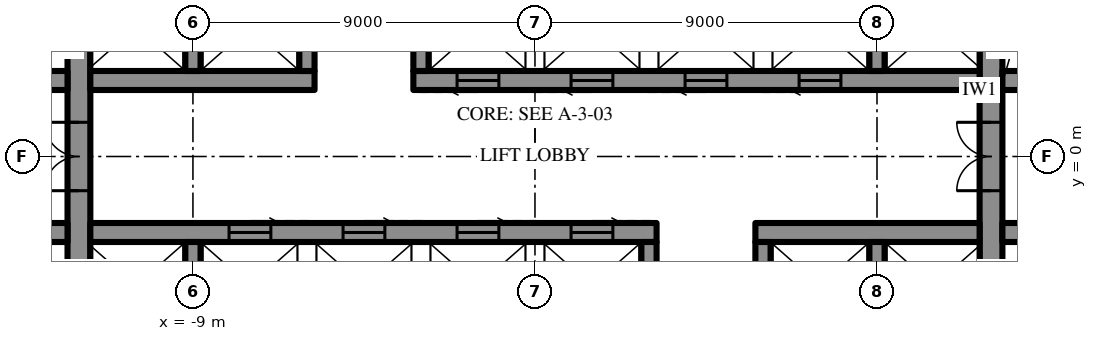
"""IFC4 building model, lengths in metres.
Left out: names, types, materials, properties, quantities, classifications, styles, units other than length and angle.
Written with IfcOpenShell. Run it as: python <this file> out.ifc"""

import sys

from ifc_helpers import new_model, si_unit, direction, frame, frame_2d, origin, place, context, subcontext, project, spatial, rectangle, extrude, element, fill, save


model = new_model("IFC4")
c1 = context("Model", 3, precision=1e-05, world=origin(), true_north=direction((0.0, 1.0)))
c2 = subcontext(c1, "Body", "Model", "MODEL_VIEW")
j1 = project(units=[si_unit("LENGTHUNIT", "METRE"), si_unit("PLANEANGLEUNIT", "RADIAN")], contexts=[c1])
p1 = place(None, origin())
s1 = spatial("IfcSite", under=j1, at=p1, CompositionType="ELEMENT")
p2 = place(p1, origin())
s2 = spatial("IfcBuilding", under=s1, at=p2, CompositionType="ELEMENT")
p3 = place(p2, frame((0.0, 0.0, 257.5)))
s3 = spatial("IfcBuildingStorey", under=s2, at=p3, CompositionType="ELEMENT", Elevation=257.5)
p4 = place(p3, frame((12.0, -10.7, 0.0), z_axis=(0.0, 0.0, 1.0), x_axis=(0.0, 1.0, 0.0)))
e1 = element("IfcWall", 1, at=p4, inside=s3, PredefinedType="SHEAR", context=c2, shape_type="SweptSolid", body=[
    extrude(rectangle(XDim=21.4, YDim=0.6, at=frame_2d((10.7, 0.0))), origin(), (0.0, 0.0, 1.0), 4.2),
])
p5 = place(p4, frame((9.8, 0.0, 0.0)))
e2 = element("IfcOpeningElement", 2, at=p5, cuts=e1, PredefinedType="OPENING", context=c2, shape_type="SweptSolid", body=[
    extrude(rectangle(XDim=1.8, YDim=2.4, at=frame_2d((0.9, 1.2))), frame((0.0, 0.31, 0.0), z_axis=(0.0, -1.0, 0.0), x_axis=(1.0, 0.0, 0.0)), (0.0, 0.0, 1.0), 0.62),
])
p6 = place(p3, frame((-12.0, -10.7, 0.0), z_axis=(0.0, 0.0, 1.0), x_axis=(0.0, 1.0, 0.0)))
e3 = element("IfcWall", 3, at=p6, inside=s3, PredefinedType="SHEAR", context=c2, shape_type="SweptSolid", body=[
    extrude(rectangle(XDim=21.4, YDim=0.6, at=frame_2d((10.7, 0.0))), origin(), (0.0, 0.0, 1.0), 4.2),
])
p7 = place(p6, frame((9.8, 0.0, 0.0)))
e4 = element("IfcOpeningElement", 4, at=p7, cuts=e3, PredefinedType="OPENING", context=c2, shape_type="SweptSolid", body=[
    extrude(rectangle(XDim=1.8, YDim=2.4, at=frame_2d((0.9, 1.2))), frame((0.0, 0.31, 0.0), z_axis=(0.0, -1.0, 0.0), x_axis=(1.0, 0.0, 0.0)), (0.0, 0.0, 1.0), 0.62),
])
p8 = place(p3, frame((-14.5, 2.0, 0.0), z_axis=(0.0, 0.0, 1.0), x_axis=(1.0, 0.0, 0.0)))
e5 = element("IfcWall", 5, at=p8, inside=s3, PredefinedType="SHEAR", context=c2, shape_type="SweptSolid", body=[
    extrude(rectangle(XDim=2.2, YDim=0.5, at=frame_2d((1.1, 0.0))), origin(), (0.0, 0.0, 1.0), 4.2),
])
p9 = place(p8, frame((0.5, 0.0, 0.0)))
e6 = element("IfcOpeningElement", 6, at=p9, cuts=e5, PredefinedType="OPENING", context=c2, shape_type="SweptSolid", body=[
    extrude(rectangle(XDim=0.9, YDim=2.2, at=frame_2d((0.45, 1.1))), frame((0.0, 0.26, 0.0), z_axis=(0.0, -1.0, 0.0), x_axis=(1.0, 0.0, 0.0)), (0.0, 0.0, 1.0), 0.52),
])
p10 = place(p3, frame((-11.7, 2.0, 0.0), z_axis=(0.0, 0.0, 1.0), x_axis=(1.0, 0.0, 0.0)))
e7 = element("IfcWall", 7, at=p10, inside=s3, PredefinedType="SHEAR", context=c2, shape_type="SweptSolid", body=[
    extrude(rectangle(XDim=5.9, YDim=0.5, at=frame_2d((2.95, 0.0))), origin(), (0.0, 0.0, 1.0), 4.2),
])
p11 = place(p3, frame((-3.2, 2.0, 0.0), z_axis=(0.0, 0.0, 1.0), x_axis=(1.0, 0.0, 0.0)))
e8 = element("IfcWall", 8, at=p11, inside=s3, PredefinedType="SHEAR", context=c2, shape_type="SweptSolid", body=[
    extrude(rectangle(XDim=14.9, YDim=0.5, at=frame_2d((7.45, 0.0))), origin(), (0.0, 0.0, 1.0), 4.2),
])
p12 = place(p11, frame((1.15, 0.0, 0.0)))
e9 = element("IfcOpeningElement", 9, at=p12, cuts=e8, PredefinedType="OPENING", context=c2, shape_type="SweptSolid", body=[
    extrude(rectangle(XDim=1.1, YDim=2.2, at=frame_2d((0.55, 1.1))), frame((0.0, 0.26, 0.0), z_axis=(0.0, -1.0, 0.0), x_axis=(1.0, 0.0, 0.0)), (0.0, 0.0, 1.0), 0.52),
])
p13 = place(p11, frame((4.15, 0.0, 0.0)))
e10 = element("IfcOpeningElement", 10, at=p13, cuts=e8, PredefinedType="OPENING", context=c2, shape_type="SweptSolid", body=[
    extrude(rectangle(XDim=1.1, YDim=2.2, at=frame_2d((0.55, 1.1))), frame((0.0, 0.26, 0.0), z_axis=(0.0, -1.0, 0.0), x_axis=(1.0, 0.0, 0.0)), (0.0, 0.0, 1.0), 0.52),
])
p14 = place(p11, frame((7.15, 0.0, 0.0)))
e11 = element("IfcOpeningElement", 11, at=p14, cuts=e8, PredefinedType="OPENING", context=c2, shape_type="SweptSolid", body=[
    extrude(rectangle(XDim=1.1, YDim=2.2, at=frame_2d((0.55, 1.1))), frame((0.0, 0.26, 0.0), z_axis=(0.0, -1.0, 0.0), x_axis=(1.0, 0.0, 0.0)), (0.0, 0.0, 1.0), 0.52),
])
p15 = place(p11, frame((10.15, 0.0, 0.0)))
e12 = element("IfcOpeningElement", 12, at=p15, cuts=e8, PredefinedType="OPENING", context=c2, shape_type="SweptSolid", body=[
    extrude(rectangle(XDim=1.1, YDim=2.2, at=frame_2d((0.55, 1.1))), frame((0.0, 0.26, 0.0), z_axis=(0.0, -1.0, 0.0), x_axis=(1.0, 0.0, 0.0)), (0.0, 0.0, 1.0), 0.52),
])
p16 = place(p3, frame((12.3, 2.0, 0.0), z_axis=(0.0, 0.0, 1.0), x_axis=(1.0, 0.0, 0.0)))
e13 = element("IfcWall", 13, at=p16, inside=s3, PredefinedType="SHEAR", context=c2, shape_type="SweptSolid", body=[
    extrude(rectangle(XDim=2.2, YDim=0.5, at=frame_2d((1.1, 0.0))), origin(), (0.0, 0.0, 1.0), 4.2),
])
p17 = place(p16, frame((0.8, 0.0, 0.0)))
e14 = element("IfcOpeningElement", 14, at=p17, cuts=e13, PredefinedType="OPENING", context=c2, shape_type="SweptSolid", body=[
    extrude(rectangle(XDim=0.9, YDim=2.2, at=frame_2d((0.45, 1.1))), frame((0.0, 0.26, 0.0), z_axis=(0.0, -1.0, 0.0), x_axis=(1.0, 0.0, 0.0)), (0.0, 0.0, 1.0), 0.52),
])
for number, where, z_axis, x_axis in (
    (15, (-9.0, 2.25, 0.0), (0.0, 0.0, 1.0), (0.0, 1.0, 0.0)),
    (16, (-6.0, 2.25, 0.0), (0.0, 0.0, 1.0), (0.0, 1.0, 0.0)),
    (17, (-3.0, 2.25, 0.0), (0.0, 0.0, 1.0), (0.0, 1.0, 0.0)),
    (18, (9.0, 2.25, 0.0), (0.0, 0.0, 1.0), (0.0, 1.0, 0.0)),
):
    element("IfcWall", number, at=place(p3, frame(where, z_axis=z_axis, x_axis=x_axis)), inside=s3, PredefinedType="SHEAR", context=c2, shape_type="SweptSolid", body=[
        extrude(rectangle(XDim=2.3, YDim=0.4, at=frame_2d((1.15, 0.0))), origin(), (0.0, 0.0, 1.0), 4.2),
    ])
p18 = place(p3, frame((14.5, -2.0, 0.0), z_axis=(0.0, 0.0, 1.0), x_axis=(-1.0, 0.0, 0.0)))
e19 = element("IfcWall", 19, at=p18, inside=s3, PredefinedType="SHEAR", context=c2, shape_type="SweptSolid", body=[
    extrude(rectangle(XDim=2.2, YDim=0.5, at=frame_2d((1.1, 0.0))), origin(), (0.0, 0.0, 1.0), 4.2),
])
p19 = place(p18, frame((0.5, 0.0, 0.0)))
e20 = element("IfcOpeningElement", 20, at=p19, cuts=e19, PredefinedType="OPENING", context=c2, shape_type="SweptSolid", body=[
    extrude(rectangle(XDim=0.9, YDim=2.2, at=frame_2d((0.45, 1.1))), frame((0.0, 0.26, 0.0), z_axis=(0.0, -1.0, 0.0), x_axis=(1.0, 0.0, 0.0)), (0.0, 0.0, 1.0), 0.52),
])
p20 = place(p3, frame((11.7, -2.0, 0.0), z_axis=(0.0, 0.0, 1.0), x_axis=(-1.0, 0.0, 0.0)))
e21 = element("IfcWall", 21, at=p20, inside=s3, PredefinedType="SHEAR", context=c2, shape_type="SweptSolid", body=[
    extrude(rectangle(XDim=5.9, YDim=0.5, at=frame_2d((2.95, 0.0))), origin(), (0.0, 0.0, 1.0), 4.2),
])
p21 = place(p3, frame((3.2, -2.0, 0.0), z_axis=(0.0, 0.0, 1.0), x_axis=(-1.0, 0.0, 0.0)))
e22 = element("IfcWall", 22, at=p21, inside=s3, PredefinedType="SHEAR", context=c2, shape_type="SweptSolid", body=[
    extrude(rectangle(XDim=14.9, YDim=0.5, at=frame_2d((7.45, 0.0))), origin(), (0.0, 0.0, 1.0), 4.2),
])
p22 = place(p21, frame((1.15, 0.0, 0.0)))
e23 = element("IfcOpeningElement", 23, at=p22, cuts=e22, PredefinedType="OPENING", context=c2, shape_type="SweptSolid", body=[
    extrude(rectangle(XDim=1.1, YDim=2.2, at=frame_2d((0.55, 1.1))), frame((0.0, 0.26, 0.0), z_axis=(0.0, -1.0, 0.0), x_axis=(1.0, 0.0, 0.0)), (0.0, 0.0, 1.0), 0.52),
])
p23 = place(p21, frame((4.15, 0.0, 0.0)))
e24 = element("IfcOpeningElement", 24, at=p23, cuts=e22, PredefinedType="OPENING", context=c2, shape_type="SweptSolid", body=[
    extrude(rectangle(XDim=1.1, YDim=2.2, at=frame_2d((0.55, 1.1))), frame((0.0, 0.26, 0.0), z_axis=(0.0, -1.0, 0.0), x_axis=(1.0, 0.0, 0.0)), (0.0, 0.0, 1.0), 0.52),
])
p24 = place(p21, frame((7.15, 0.0, 0.0)))
e25 = element("IfcOpeningElement", 25, at=p24, cuts=e22, PredefinedType="OPENING", context=c2, shape_type="SweptSolid", body=[
    extrude(rectangle(XDim=1.1, YDim=2.2, at=frame_2d((0.55, 1.1))), frame((0.0, 0.26, 0.0), z_axis=(0.0, -1.0, 0.0), x_axis=(1.0, 0.0, 0.0)), (0.0, 0.0, 1.0), 0.52),
])
p25 = place(p21, frame((10.15, 0.0, 0.0)))
e26 = element("IfcOpeningElement", 26, at=p25, cuts=e22, PredefinedType="OPENING", context=c2, shape_type="SweptSolid", body=[
    extrude(rectangle(XDim=1.1, YDim=2.2, at=frame_2d((0.55, 1.1))), frame((0.0, 0.26, 0.0), z_axis=(0.0, -1.0, 0.0), x_axis=(1.0, 0.0, 0.0)), (0.0, 0.0, 1.0), 0.52),
])
p26 = place(p3, frame((-12.3, -2.0, 0.0), z_axis=(0.0, 0.0, 1.0), x_axis=(-1.0, 0.0, 0.0)))
e27 = element("IfcWall", 27, at=p26, inside=s3, PredefinedType="SHEAR", context=c2, shape_type="SweptSolid", body=[
    extrude(rectangle(XDim=2.2, YDim=0.5, at=frame_2d((1.1, 0.0))), origin(), (0.0, 0.0, 1.0), 4.2),
])
p27 = place(p26, frame((0.8, 0.0, 0.0)))
e28 = element("IfcOpeningElement", 28, at=p27, cuts=e27, PredefinedType="OPENING", context=c2, shape_type="SweptSolid", body=[
    extrude(rectangle(XDim=0.9, YDim=2.2, at=frame_2d((0.45, 1.1))), frame((0.0, 0.26, 0.0), z_axis=(0.0, -1.0, 0.0), x_axis=(1.0, 0.0, 0.0)), (0.0, 0.0, 1.0), 0.52),
])
for number, where, z_axis, x_axis in (
    (29, (9.0, -2.25, 0.0), (0.0, 0.0, 1.0), (0.0, -1.0, 0.0)),
    (30, (6.0, -2.25, 0.0), (0.0, 0.0, 1.0), (0.0, -1.0, 0.0)),
    (31, (3.0, -2.25, 0.0), (0.0, 0.0, 1.0), (0.0, -1.0, 0.0)),
    (32, (-9.0, -2.25, 0.0), (0.0, 0.0, 1.0), (0.0, -1.0, 0.0)),
):
    element("IfcWall", number, at=place(p3, frame(where, z_axis=z_axis, x_axis=x_axis)), inside=s3, PredefinedType="SHEAR", context=c2, shape_type="SweptSolid", body=[
        extrude(rectangle(XDim=2.3, YDim=0.4, at=frame_2d((1.15, 0.0))), origin(), (0.0, 0.0, 1.0), 4.2),
    ])
p28 = place(p5, origin())
e33 = element("IfcDoor", 33, at=p28, inside=s3, OperationType="DOUBLE_DOOR_SINGLE_SWING", PredefinedType="DOOR", context=c2, shape_type="SweptSolid", body=[
    extrude(rectangle(XDim=1.8, YDim=2.4, at=frame_2d((0.9, 1.2))), frame((0.0, 0.025, 0.0), z_axis=(0.0, -1.0, 0.0), x_axis=(1.0, 0.0, 0.0)), (0.0, 0.0, 1.0), 0.05),
])
fill(e2, e33)
p29 = place(p7, origin())
e34 = element("IfcDoor", 34, at=p29, inside=s3, OperationType="DOUBLE_DOOR_SINGLE_SWING", PredefinedType="DOOR", context=c2, shape_type="SweptSolid", body=[
    extrude(rectangle(XDim=1.8, YDim=2.4, at=frame_2d((0.9, 1.2))), frame((0.0, 0.025, 0.0), z_axis=(0.0, -1.0, 0.0), x_axis=(1.0, 0.0, 0.0)), (0.0, 0.0, 1.0), 0.05),
])
fill(e4, e34)
p30 = place(p12, frame((1.1, 0.0, 0.0), z_axis=(0.0, 0.0, 1.0), x_axis=(-1.0, 0.0, 0.0)))
e35 = element("IfcDoor", 35, at=p30, inside=s3, OperationType="SLIDING_TO_LEFT", PredefinedType="DOOR", context=c2, shape_type="SweptSolid", body=[
    extrude(rectangle(XDim=1.1, YDim=2.2, at=frame_2d((0.55, 1.1))), frame((0.0, 0.025, 0.0), z_axis=(0.0, -1.0, 0.0), x_axis=(1.0, 0.0, 0.0)), (0.0, 0.0, 1.0), 0.05),
])
fill(e9, e35)
p31 = place(p13, frame((1.1, 0.0, 0.0), z_axis=(0.0, 0.0, 1.0), x_axis=(-1.0, 0.0, 0.0)))
e36 = element("IfcDoor", 36, at=p31, inside=s3, OperationType="SLIDING_TO_LEFT", PredefinedType="DOOR", context=c2, shape_type="SweptSolid", body=[
    extrude(rectangle(XDim=1.1, YDim=2.2, at=frame_2d((0.55, 1.1))), frame((0.0, 0.025, 0.0), z_axis=(0.0, -1.0, 0.0), x_axis=(1.0, 0.0, 0.0)), (0.0, 0.0, 1.0), 0.05),
])
fill(e10, e36)
p32 = place(p14, frame((1.1, 0.0, 0.0), z_axis=(0.0, 0.0, 1.0), x_axis=(-1.0, 0.0, 0.0)))
e37 = element("IfcDoor", 37, at=p32, inside=s3, OperationType="SLIDING_TO_LEFT", PredefinedType="DOOR", context=c2, shape_type="SweptSolid", body=[
    extrude(rectangle(XDim=1.1, YDim=2.2, at=frame_2d((0.55, 1.1))), frame((0.0, 0.025, 0.0), z_axis=(0.0, -1.0, 0.0), x_axis=(1.0, 0.0, 0.0)), (0.0, 0.0, 1.0), 0.05),
])
fill(e11, e37)
p33 = place(p15, frame((1.1, 0.0, 0.0), z_axis=(0.0, 0.0, 1.0), x_axis=(-1.0, 0.0, 0.0)))
e38 = element("IfcDoor", 38, at=p33, inside=s3, OperationType="SLIDING_TO_LEFT", PredefinedType="DOOR", context=c2, shape_type="SweptSolid", body=[
    extrude(rectangle(XDim=1.1, YDim=2.2, at=frame_2d((0.55, 1.1))), frame((0.0, 0.025, 0.0), z_axis=(0.0, -1.0, 0.0), x_axis=(1.0, 0.0, 0.0)), (0.0, 0.0, 1.0), 0.05),
])
fill(e12, e38)
p34 = place(p22, frame((1.1, 0.0, 0.0), z_axis=(0.0, 0.0, 1.0), x_axis=(-1.0, 0.0, 0.0)))
e39 = element("IfcDoor", 39, at=p34, inside=s3, OperationType="SLIDING_TO_LEFT", PredefinedType="DOOR", context=c2, shape_type="SweptSolid", body=[
    extrude(rectangle(XDim=1.1, YDim=2.2, at=frame_2d((0.55, 1.1))), frame((0.0, 0.025, 0.0), z_axis=(0.0, -1.0, 0.0), x_axis=(1.0, 0.0, 0.0)), (0.0, 0.0, 1.0), 0.05),
])
fill(e23, e39)
p35 = place(p23, frame((1.1, 0.0, 0.0), z_axis=(0.0, 0.0, 1.0), x_axis=(-1.0, 0.0, 0.0)))
e40 = element("IfcDoor", 40, at=p35, inside=s3, OperationType="SLIDING_TO_LEFT", PredefinedType="DOOR", context=c2, shape_type="SweptSolid", body=[
    extrude(rectangle(XDim=1.1, YDim=2.2, at=frame_2d((0.55, 1.1))), frame((0.0, 0.025, 0.0), z_axis=(0.0, -1.0, 0.0), x_axis=(1.0, 0.0, 0.0)), (0.0, 0.0, 1.0), 0.05),
])
fill(e24, e40)
p36 = place(p24, frame((1.1, 0.0, 0.0), z_axis=(0.0, 0.0, 1.0), x_axis=(-1.0, 0.0, 0.0)))
e41 = element("IfcDoor", 41, at=p36, inside=s3, OperationType="SLIDING_TO_LEFT", PredefinedType="DOOR", context=c2, shape_type="SweptSolid", body=[
    extrude(rectangle(XDim=1.1, YDim=2.2, at=frame_2d((0.55, 1.1))), frame((0.0, 0.025, 0.0), z_axis=(0.0, -1.0, 0.0), x_axis=(1.0, 0.0, 0.0)), (0.0, 0.0, 1.0), 0.05),
])
fill(e25, e41)
p37 = place(p25, frame((1.1, 0.0, 0.0), z_axis=(0.0, 0.0, 1.0), x_axis=(-1.0, 0.0, 0.0)))
e42 = element("IfcDoor", 42, at=p37, inside=s3, OperationType="SLIDING_TO_LEFT", PredefinedType="DOOR", context=c2, shape_type="SweptSolid", body=[
    extrude(rectangle(XDim=1.1, YDim=2.2, at=frame_2d((0.55, 1.1))), frame((0.0, 0.025, 0.0), z_axis=(0.0, -1.0, 0.0), x_axis=(1.0, 0.0, 0.0)), (0.0, 0.0, 1.0), 0.05),
])
fill(e26, e42)
save(model, sys.argv[1])
